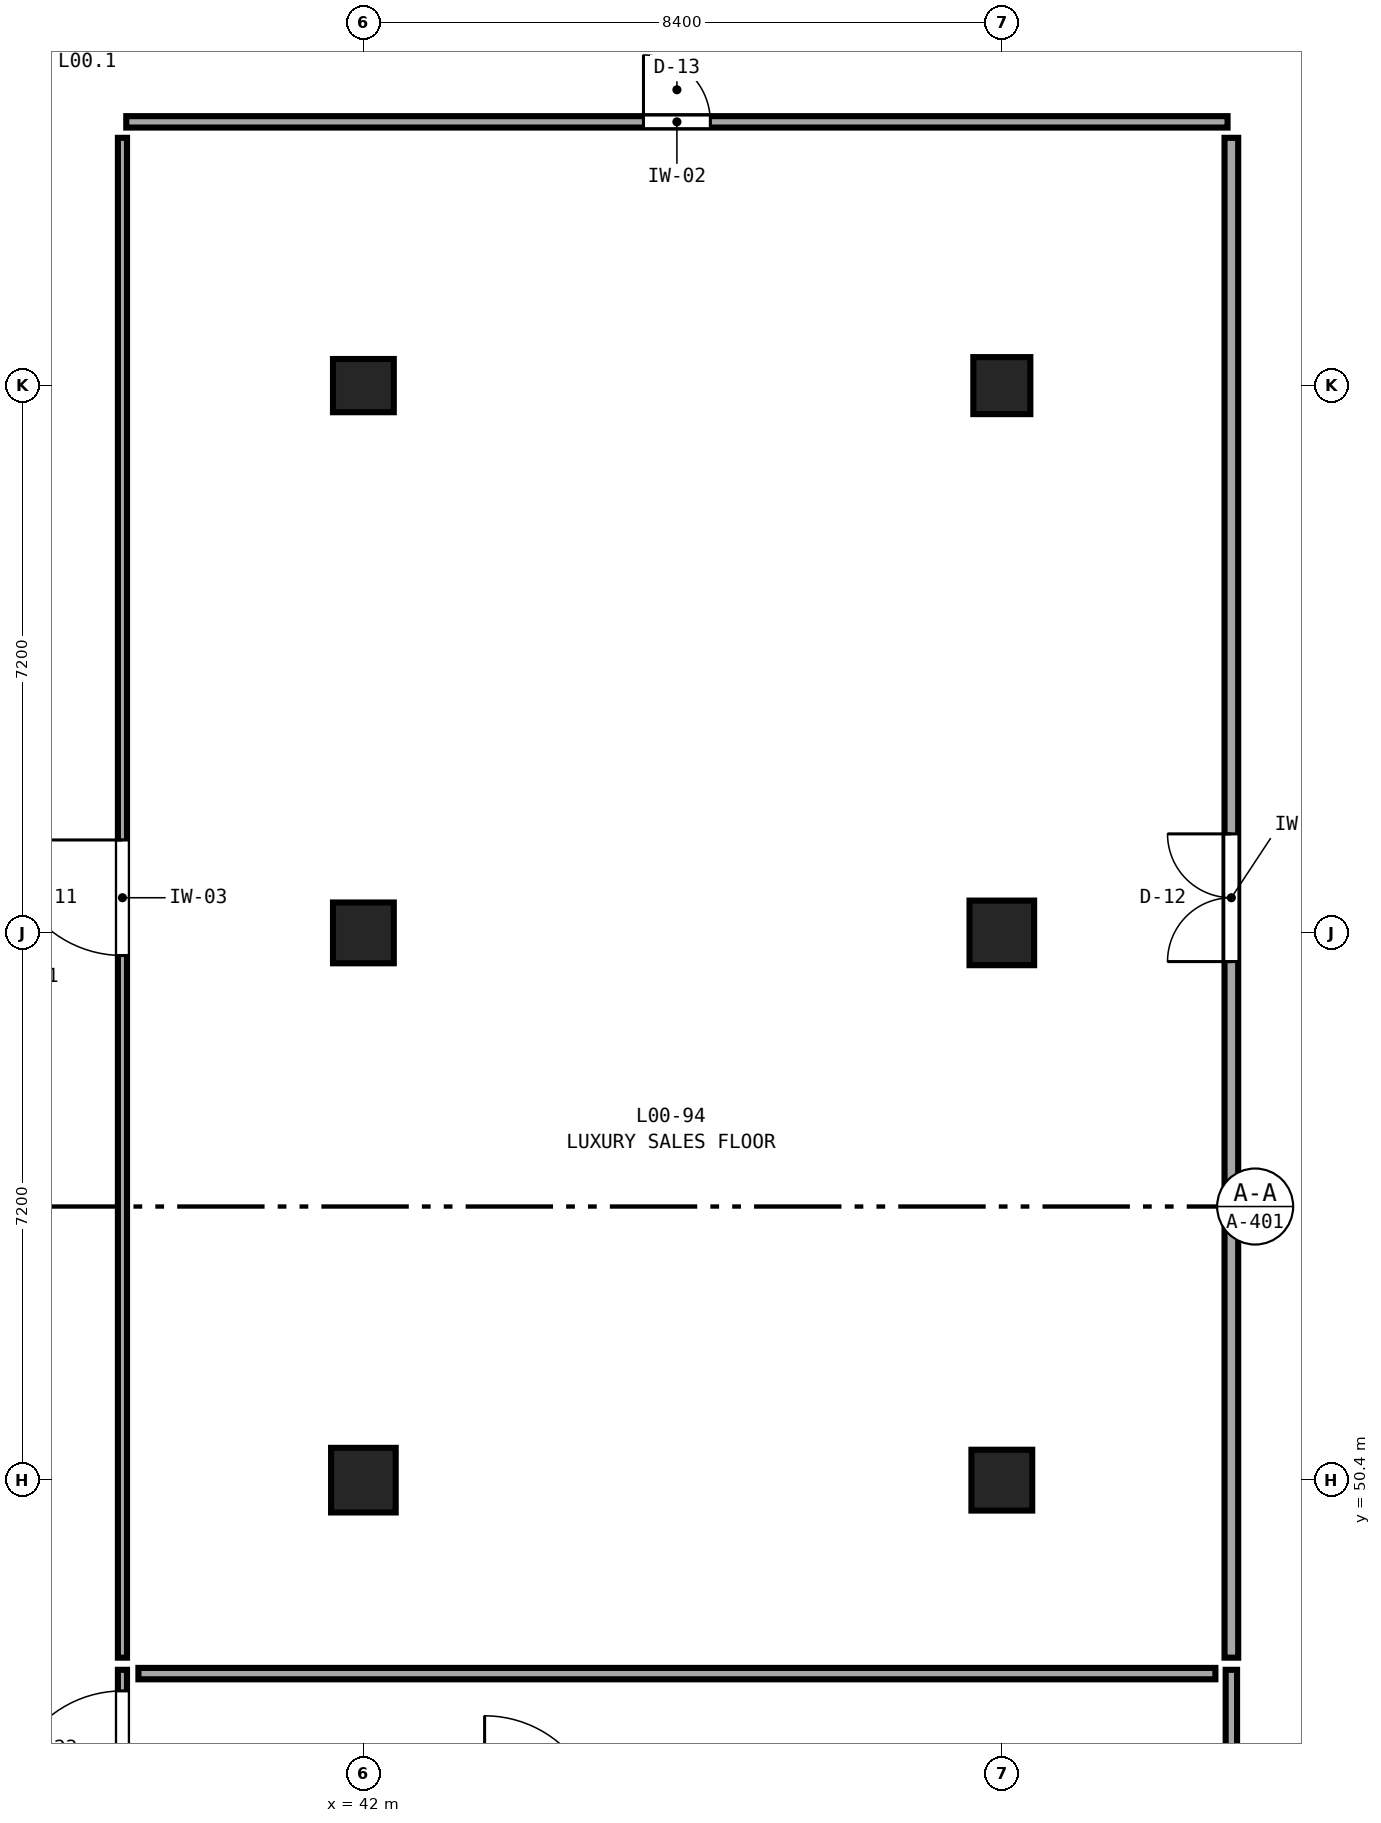
"""IFC4 building model, lengths in metres.
Left out: names, types, materials, properties, quantities, classifications, styles, units other than length and angle.
Written with IfcOpenShell. Run it as: python <this file> out.ifc"""

import sys

from ifc_helpers import new_model, si_unit, direction, frame, frame_2d, origin, origin_2d, place, context, subcontext, project, spatial, rectangle, extrude, element, fill, save


model = new_model("IFC4")
c1 = context("Model", 3, precision=1e-05, world=origin(), true_north=direction((0.0, 1.0)))
c2 = subcontext(c1, "Body", "Model", "MODEL_VIEW")
j1 = project(units=[si_unit("LENGTHUNIT", "METRE"), si_unit("PLANEANGLEUNIT", "RADIAN")], contexts=[c1])
p1 = place(None, origin())
s1 = spatial("IfcSite", under=j1, at=p1, CompositionType="ELEMENT")
p2 = place(p1, origin())
s2 = spatial("IfcBuilding", under=s1, at=p2, CompositionType="ELEMENT")
p3 = place(p2, origin())
s3 = spatial("IfcBuildingStorey", under=s2, at=p3, CompositionType="ELEMENT", Elevation=0.0)
p4 = place(p3, frame((42.0, 50.4, 0.0), z_axis=(0.0, 0.0, 1.0), x_axis=(1.0, 0.0, 0.0)))
e1 = element("IfcColumn", 1, at=p4, inside=s3, PredefinedType="COLUMN", context=c2, shape_type="SweptSolid", body=[
    extrude(rectangle(XDim=0.85, YDim=0.85, at=origin_2d()), origin(), (0.0, 0.0, 1.0), 5.4),
])
p5 = place(p3, frame((42.0, 57.6, 0.0), z_axis=(0.0, 0.0, 1.0), x_axis=(1.0, 0.0, 0.0)))
e2 = element("IfcColumn", 2, at=p5, inside=s3, PredefinedType="COLUMN", context=c2, shape_type="SweptSolid", body=[
    extrude(rectangle(XDim=0.8, YDim=0.8, at=origin_2d()), origin(), (0.0, 0.0, 1.0), 5.4),
])
p6 = place(p3, frame((42.0, 64.8, 0.0), z_axis=(0.0, 0.0, 1.0), x_axis=(1.0, 0.0, 0.0)))
e3 = element("IfcColumn", 3, at=p6, inside=s3, PredefinedType="COLUMN", context=c2, shape_type="SweptSolid", body=[
    extrude(rectangle(XDim=0.8, YDim=0.7, at=origin_2d()), origin(), (0.0, 0.0, 1.0), 5.4),
])
p7 = place(p3, frame((50.4, 50.4, 0.0), z_axis=(0.0, 0.0, 1.0), x_axis=(1.0, 0.0, 0.0)))
e4 = element("IfcColumn", 4, at=p7, inside=s3, PredefinedType="COLUMN", context=c2, shape_type="SweptSolid", body=[
    extrude(rectangle(XDim=0.8, YDim=0.8, at=origin_2d()), origin(), (0.0, 0.0, 1.0), 5.4),
])
p8 = place(p3, frame((50.4, 57.6, 0.0), z_axis=(0.0, 0.0, 1.0), x_axis=(1.0, 0.0, 0.0)))
e5 = element("IfcColumn", 5, at=p8, inside=s3, PredefinedType="COLUMN", context=c2, shape_type="SweptSolid", body=[
    extrude(rectangle(XDim=0.85, YDim=0.85, at=origin_2d()), origin(), (0.0, 0.0, 1.0), 5.4),
])
p9 = place(p3, frame((50.4, 64.8, 0.0), z_axis=(0.0, 0.0, 1.0), x_axis=(1.0, 0.0, 0.0)))
e6 = element("IfcColumn", 6, at=p9, inside=s3, PredefinedType="COLUMN", context=c2, shape_type="SweptSolid", body=[
    extrude(rectangle(XDim=0.75, YDim=0.75, at=origin_2d()), origin(), (0.0, 0.0, 1.0), 5.4),
])
p10 = place(p3, frame((53.42, 27.33, 0.0), z_axis=(0.0, 0.0, 1.0), x_axis=(0.0, 1.0, 0.0)))
e7 = element("IfcWall", 7, at=p10, inside=s3, PredefinedType="PARTITIONING", context=c2, shape_type="SweptSolid", body=[
    extrude(rectangle(XDim=20.575, YDim=0.15, at=frame_2d((10.288, 0.0))), origin(), (0.0, 0.0, 1.0), 5.08),
])
p11 = place(p10, frame((9.847, 0.0, 0.0)))
e8 = element("IfcOpeningElement", 8, at=p11, cuts=e7, PredefinedType="OPENING", context=c2, shape_type="SweptSolid", body=[
    extrude(rectangle(XDim=0.88, YDim=2.13, at=frame_2d((0.44, 1.065))), frame((0.0, 0.095, 0.0), z_axis=(0.0, -1.0, 0.0), x_axis=(1.0, 0.0, 0.0)), (0.0, 0.0, 1.0), 0.19),
])
p12 = place(p3, frame((38.83, 48.065, 0.0), z_axis=(0.0, 0.0, 1.0), x_axis=(0.0, 1.0, 0.0)))
e9 = element("IfcWall", 9, at=p12, inside=s3, PredefinedType="PARTITIONING", context=c2, shape_type="SweptSolid", body=[
    extrude(rectangle(XDim=19.995, YDim=0.12, at=frame_2d((9.998, 0.0))), origin(), (0.0, 0.0, 1.0), 5.08),
])
p13 = place(p12, frame((9.238, 0.0, 0.0)))
e10 = element("IfcOpeningElement", 10, at=p13, cuts=e9, PredefinedType="OPENING", context=c2, shape_type="SweptSolid", body=[
    extrude(rectangle(XDim=1.52, YDim=2.13, at=frame_2d((0.76, 1.065))), frame((0.0, 0.08, 0.0), z_axis=(0.0, -1.0, 0.0), x_axis=(1.0, 0.0, 0.0)), (0.0, 0.0, 1.0), 0.16),
])
p14 = place(p3, frame((53.42, 48.065, 0.0), z_axis=(0.0, 0.0, 1.0), x_axis=(0.0, 1.0, 0.0)))
e11 = element("IfcWall", 11, at=p14, inside=s3, PredefinedType="PARTITIONING", context=c2, shape_type="SweptSolid", body=[
    extrude(rectangle(XDim=19.995, YDim=0.18, at=frame_2d((9.998, 0.0))), origin(), (0.0, 0.0, 1.0), 5.08),
])
p15 = place(p14, frame((9.157, 0.0, 0.0)))
e12 = element("IfcOpeningElement", 12, at=p15, cuts=e11, PredefinedType="OPENING", context=c2, shape_type="SweptSolid", body=[
    extrude(rectangle(XDim=1.68, YDim=2.13, at=frame_2d((0.84, 1.065))), frame((0.0, 0.11, 0.0), z_axis=(0.0, -1.0, 0.0), x_axis=(1.0, 0.0, 0.0)), (0.0, 0.0, 1.0), 0.22),
])
p16 = place(p3, frame((38.88, 68.27, 0.0), z_axis=(0.0, 0.0, 1.0), x_axis=(1.0, 0.0, 0.0)))
e13 = element("IfcWall", 13, at=p16, inside=s3, PredefinedType="PARTITIONING", context=c2, shape_type="SweptSolid", body=[
    extrude(rectangle(XDim=14.49, YDim=0.15, at=frame_2d((7.245, 0.0))), origin(), (0.0, 0.0, 1.0), 5.08),
])
p17 = place(p16, frame((6.805, 0.0, 0.0)))
e14 = element("IfcOpeningElement", 14, at=p17, cuts=e13, PredefinedType="OPENING", context=c2, shape_type="SweptSolid", body=[
    extrude(rectangle(XDim=0.88, YDim=2.21, at=frame_2d((0.44, 1.105))), frame((0.0, 0.095, 0.0), z_axis=(0.0, -1.0, 0.0), x_axis=(1.0, 0.0, 0.0)), (0.0, 0.0, 1.0), 0.19),
])
p18 = place(p3, frame((38.83, 45.83, 0.0), z_axis=(0.0, 0.0, 1.0), x_axis=(0.0, 1.0, 0.0)))
e15 = element("IfcWall", 15, at=p18, inside=s3, PredefinedType="PARTITIONING", context=c2, shape_type="SweptSolid", body=[
    extrude(rectangle(XDim=2.075, YDim=0.12, at=frame_2d((1.038, 0.0))), origin(), (0.0, 0.0, 1.0), 5.08),
])
p19 = place(p18, frame((0.278, 0.0, 0.0)))
e16 = element("IfcOpeningElement", 16, at=p19, cuts=e15, PredefinedType="OPENING", context=c2, shape_type="SweptSolid", body=[
    extrude(rectangle(XDim=1.52, YDim=2.29, at=frame_2d((0.76, 1.145))), frame((0.0, 0.08, 0.0), z_axis=(0.0, -1.0, 0.0), x_axis=(1.0, 0.0, 0.0)), (0.0, 0.0, 1.0), 0.16),
])
p20 = place(p3, frame((39.04, 47.855, 0.0), z_axis=(0.0, 0.0, 1.0), x_axis=(1.0, 0.0, 0.0)))
e17 = element("IfcWall", 17, at=p20, inside=s3, PredefinedType="PARTITIONING", context=c2, shape_type="SweptSolid", body=[
    extrude(rectangle(XDim=14.17, YDim=0.15, at=frame_2d((7.085, 0.0))), origin(), (0.0, 0.0, 1.0), 5.08),
])
p21 = place(p13, frame((1.52, 0.0, 0.0), z_axis=(0.0, 0.0, 1.0), x_axis=(-1.0, 0.0, 0.0)))
e18 = element("IfcDoor", 18, at=p21, inside=s3, OperationType="SINGLE_SWING_RIGHT", PredefinedType="DOOR", context=c2, shape_type="SweptSolid", body=[
    extrude(rectangle(XDim=1.52, YDim=2.13, at=frame_2d((0.76, 1.065))), frame((0.0, 0.025, 0.0), z_axis=(0.0, -1.0, 0.0), x_axis=(1.0, 0.0, 0.0)), (0.0, 0.0, 1.0), 0.05),
])
fill(e10, e18)
p22 = place(p15, origin())
e19 = element("IfcDoor", 19, at=p22, inside=s3, OperationType="DOUBLE_DOOR_SINGLE_SWING", PredefinedType="DOOR", context=c2, shape_type="SweptSolid", body=[
    extrude(rectangle(XDim=1.68, YDim=2.13, at=frame_2d((0.84, 1.065))), frame((0.0, 0.025, 0.0), z_axis=(0.0, -1.0, 0.0), x_axis=(1.0, 0.0, 0.0)), (0.0, 0.0, 1.0), 0.05),
])
fill(e12, e19)
p23 = place(p17, frame((0.88, 0.0, 0.0), z_axis=(0.0, 0.0, 1.0), x_axis=(-1.0, 0.0, 0.0)))
e20 = element("IfcDoor", 20, at=p23, inside=s3, OperationType="SINGLE_SWING_LEFT", PredefinedType="DOOR", context=c2, shape_type="SweptSolid", body=[
    extrude(rectangle(XDim=0.88, YDim=2.21, at=frame_2d((0.44, 1.105))), frame((0.0, 0.025, 0.0), z_axis=(0.0, -1.0, 0.0), x_axis=(1.0, 0.0, 0.0)), (0.0, 0.0, 1.0), 0.05),
])
fill(e14, e20)
p24 = place(p19, frame((1.52, 0.0, 0.0), z_axis=(0.0, 0.0, 1.0), x_axis=(-1.0, 0.0, 0.0)))
e21 = element("IfcDoor", 21, at=p24, inside=s3, OperationType="SINGLE_SWING_LEFT", PredefinedType="DOOR", context=c2, shape_type="SweptSolid", body=[
    extrude(rectangle(XDim=1.52, YDim=2.29, at=frame_2d((0.76, 1.145))), frame((0.0, 0.025, 0.0), z_axis=(0.0, -1.0, 0.0), x_axis=(1.0, 0.0, 0.0)), (0.0, 0.0, 1.0), 0.05),
])
fill(e16, e21)
save(model, sys.argv[1])
